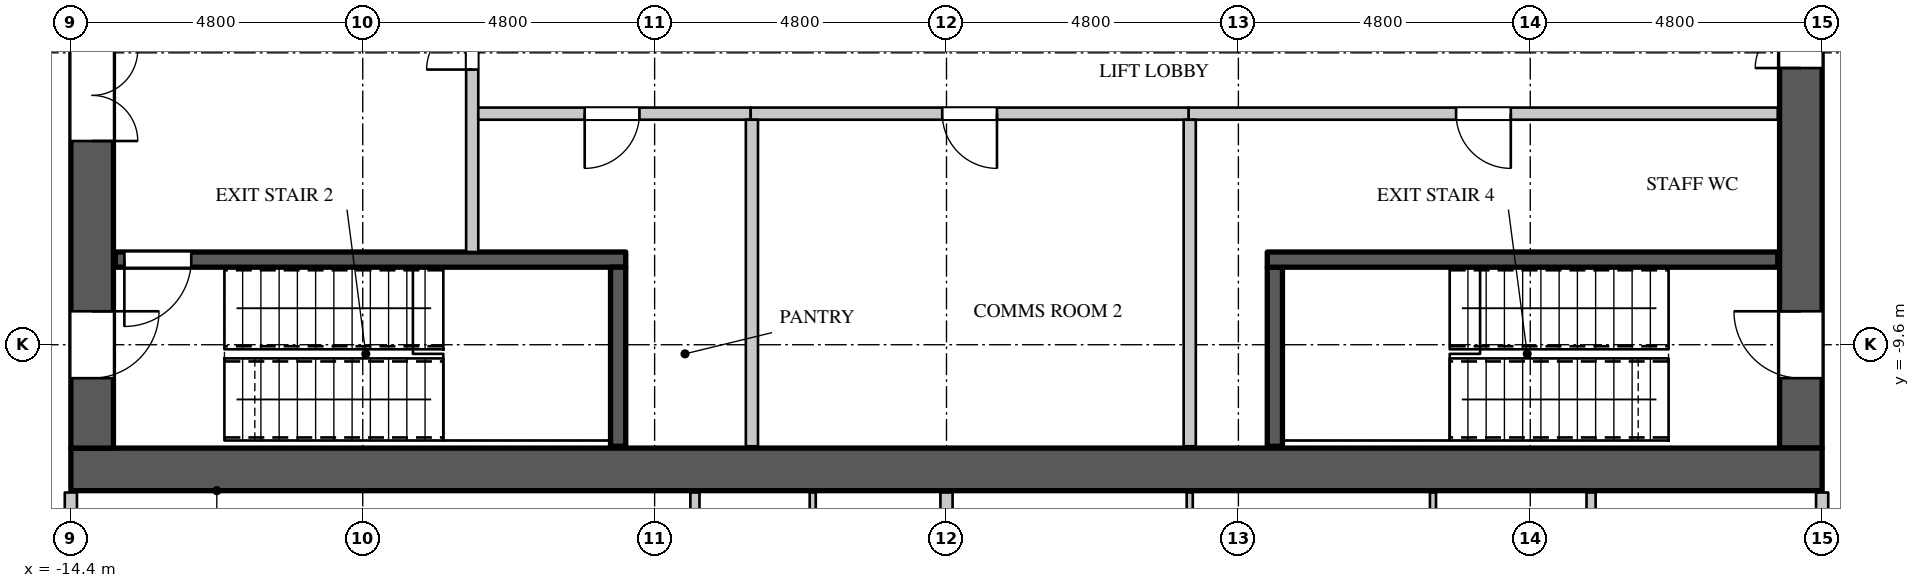
"""IFC4 building model, lengths in metres.
Left out: names, types, materials, properties, quantities, classifications, styles, units other than length and angle.
Written with IfcOpenShell. Run it as: python <this file> out.ifc"""

import sys

from ifc_helpers import new_model, si_unit, direction, frame, frame_2d, origin, place, context, subcontext, project, spatial, rectangle, extrude, element, fill, save


model = new_model("IFC4")
c1 = context("Model", 3, precision=1e-05, world=origin(), true_north=direction((0.0, 1.0)))
c2 = subcontext(c1, "Body", "Model", "MODEL_VIEW")
j1 = project(units=[si_unit("LENGTHUNIT", "METRE"), si_unit("PLANEANGLEUNIT", "RADIAN")], contexts=[c1])
p1 = place(None, origin())
s1 = spatial("IfcSite", under=j1, at=p1, CompositionType="ELEMENT")
p2 = place(p1, origin())
s2 = spatial("IfcBuilding", under=s1, at=p2, CompositionType="ELEMENT")
p3 = place(p2, frame((0.0, 0.0, 200.1)))
s3 = spatial("IfcBuildingStorey", under=s2, at=p3, CompositionType="ELEMENT", Elevation=200.1)
p4 = place(p3, frame((-14.4, -11.65, 0.0), z_axis=(0.0, 0.0, 1.0), x_axis=(1.0, 0.0, 0.0)))
e1 = element("IfcWall", 1, at=p4, inside=s3, PredefinedType="SHEAR", context=c2, shape_type="SweptSolid", body=[
    extrude(rectangle(XDim=28.8, YDim=0.7, at=frame_2d((14.4, 0.0))), origin(), (0.0, 0.0, 1.0), 4.2),
])
p5 = place(p3, frame((14.05, -11.3, 0.0), z_axis=(0.0, 0.0, 1.0), x_axis=(0.0, 1.0, 0.0)))
e2 = element("IfcWall", 2, at=p5, inside=s3, PredefinedType="SHEAR", context=c2, shape_type="SweptSolid", body=[
    extrude(rectangle(XDim=22.6, YDim=0.7, at=frame_2d((11.3, 0.0))), origin(), (0.0, 0.0, 1.0), 4.2),
])
p6 = place(p5, frame((20.35, 0.0, 0.0)))
e3 = element("IfcOpeningElement", 3, at=p6, cuts=e2, PredefinedType="OPENING", context=c2, shape_type="SweptSolid", body=[
    extrude(rectangle(XDim=1.1, YDim=2.2, at=frame_2d((0.55, 1.1))), frame((0.0, 0.36, 0.0), z_axis=(0.0, -1.0, 0.0), x_axis=(1.0, 0.0, 0.0)), (0.0, 0.0, 1.0), 0.72),
])
p7 = place(p5, frame((1.15, 0.0, 0.0)))
e4 = element("IfcOpeningElement", 4, at=p7, cuts=e2, PredefinedType="OPENING", context=c2, shape_type="SweptSolid", body=[
    extrude(rectangle(XDim=1.1, YDim=2.2, at=frame_2d((0.55, 1.1))), frame((0.0, 0.36, 0.0), z_axis=(0.0, -1.0, 0.0), x_axis=(1.0, 0.0, 0.0)), (0.0, 0.0, 1.0), 0.72),
])
p8 = place(p5, frame((14.85, 0.0, 0.0)))
e5 = element("IfcOpeningElement", 5, at=p8, cuts=e2, PredefinedType="OPENING", context=c2, shape_type="SweptSolid", body=[
    extrude(rectangle(XDim=1.5, YDim=2.4, at=frame_2d((0.75, 1.2))), frame((0.0, 0.36, 0.0), z_axis=(0.0, -1.0, 0.0), x_axis=(1.0, 0.0, 0.0)), (0.0, 0.0, 1.0), 0.72),
])
p9 = place(p5, frame((6.25, 0.0, 0.0)))
e6 = element("IfcOpeningElement", 6, at=p9, cuts=e2, PredefinedType="OPENING", context=c2, shape_type="SweptSolid", body=[
    extrude(rectangle(XDim=1.5, YDim=2.4, at=frame_2d((0.75, 1.2))), frame((0.0, 0.36, 0.0), z_axis=(0.0, -1.0, 0.0), x_axis=(1.0, 0.0, 0.0)), (0.0, 0.0, 1.0), 0.72),
])
p10 = place(p3, frame((-14.05, -11.3, 0.0), z_axis=(0.0, 0.0, 1.0), x_axis=(0.0, 1.0, 0.0)))
e7 = element("IfcWall", 7, at=p10, inside=s3, PredefinedType="SHEAR", context=c2, shape_type="SweptSolid", body=[
    extrude(rectangle(XDim=22.6, YDim=0.7, at=frame_2d((11.3, 0.0))), origin(), (0.0, 0.0, 1.0), 4.2),
])
p11 = place(p10, frame((20.35, 0.0, 0.0)))
e8 = element("IfcOpeningElement", 8, at=p11, cuts=e7, PredefinedType="OPENING", context=c2, shape_type="SweptSolid", body=[
    extrude(rectangle(XDim=1.1, YDim=2.2, at=frame_2d((0.55, 1.1))), frame((0.0, 0.36, 0.0), z_axis=(0.0, -1.0, 0.0), x_axis=(1.0, 0.0, 0.0)), (0.0, 0.0, 1.0), 0.72),
])
p12 = place(p10, frame((1.15, 0.0, 0.0)))
e9 = element("IfcOpeningElement", 9, at=p12, cuts=e7, PredefinedType="OPENING", context=c2, shape_type="SweptSolid", body=[
    extrude(rectangle(XDim=1.1, YDim=2.2, at=frame_2d((0.55, 1.1))), frame((0.0, 0.36, 0.0), z_axis=(0.0, -1.0, 0.0), x_axis=(1.0, 0.0, 0.0)), (0.0, 0.0, 1.0), 0.72),
])
p13 = place(p10, frame((16.05, 0.0, 0.0)))
e10 = element("IfcOpeningElement", 10, at=p13, cuts=e7, PredefinedType="OPENING", context=c2, shape_type="SweptSolid", body=[
    extrude(rectangle(XDim=1.5, YDim=2.4, at=frame_2d((0.75, 1.2))), frame((0.0, 0.36, 0.0), z_axis=(0.0, -1.0, 0.0), x_axis=(1.0, 0.0, 0.0)), (0.0, 0.0, 1.0), 0.72),
])
p14 = place(p10, frame((5.05, 0.0, 0.0)))
e11 = element("IfcOpeningElement", 11, at=p14, cuts=e7, PredefinedType="OPENING", context=c2, shape_type="SweptSolid", body=[
    extrude(rectangle(XDim=1.5, YDim=2.4, at=frame_2d((0.75, 1.2))), frame((0.0, 0.36, 0.0), z_axis=(0.0, -1.0, 0.0), x_axis=(1.0, 0.0, 0.0)), (0.0, 0.0, 1.0), 0.72),
])
p15 = place(p3, frame((-14.4, -14.3, 0.0), z_axis=(0.0, 0.0, 1.0), x_axis=(0.0, 1.0, 0.0)))
e12 = element("IfcWall", 12, at=p15, inside=s3, PredefinedType="PARTITIONING", context=c2, shape_type="SweptSolid", body=[
    extrude(rectangle(XDim=2.27, YDim=0.2, at=frame_2d((1.135, 0.0))), origin(), (0.0, 0.0, 1.0), 3.798),
])
p16 = place(p3, frame((-7.8, -8.075, 0.0), z_axis=(0.0, 0.0, 1.0), x_axis=(0.0, 1.0, 0.0)))
e13 = element("IfcWall", 13, at=p16, inside=s3, PredefinedType="PARTITIONING", context=c2, shape_type="SweptSolid", body=[
    extrude(rectangle(XDim=5.275, YDim=0.2, at=frame_2d((2.637, 0.0))), origin(), (0.0, 0.0, 1.0), 3.798),
])
p17 = place(p16, frame((3.0, 0.0, 0.0)))
e14 = element("IfcOpeningElement", 14, at=p17, cuts=e13, PredefinedType="OPENING", context=c2, shape_type="SweptSolid", body=[
    extrude(rectangle(XDim=1.5, YDim=2.4, at=frame_2d((0.75, 1.2))), frame((0.0, 0.11, 0.0), z_axis=(0.0, -1.0, 0.0), x_axis=(1.0, 0.0, 0.0)), (0.0, 0.0, 1.0), 0.22),
])
p18 = place(p3, frame((-7.7, -5.8, 0.0), z_axis=(0.0, 0.0, 1.0), x_axis=(1.0, 0.0, 0.0)))
e15 = element("IfcWall", 15, at=p18, inside=s3, PredefinedType="PARTITIONING", context=c2, shape_type="SweptSolid", body=[
    extrude(rectangle(XDim=4.48, YDim=0.2, at=frame_2d((2.24, 0.0))), origin(), (0.0, 0.0, 1.0), 3.798),
])
p19 = place(p18, frame((1.75, 0.0, 0.0)))
e16 = element("IfcOpeningElement", 16, at=p19, cuts=e15, PredefinedType="OPENING", context=c2, shape_type="SweptSolid", body=[
    extrude(rectangle(XDim=0.9, YDim=2.2, at=frame_2d((0.45, 1.1))), frame((0.0, 0.11, 0.0), z_axis=(0.0, -1.0, 0.0), x_axis=(1.0, 0.0, 0.0)), (0.0, 0.0, 1.0), 0.22),
])
p20 = place(p3, frame((3.98, -5.8, 0.0), z_axis=(0.0, 0.0, 1.0), x_axis=(1.0, 0.0, 0.0)))
e17 = element("IfcWall", 17, at=p20, inside=s3, PredefinedType="PARTITIONING", context=c2, shape_type="SweptSolid", body=[
    extrude(rectangle(XDim=9.69, YDim=0.2, at=frame_2d((4.845, 0.0))), origin(), (0.0, 0.0, 1.0), 3.798),
])
p21 = place(p20, frame((4.4, 0.0, 0.0)))
e18 = element("IfcOpeningElement", 18, at=p21, cuts=e17, PredefinedType="OPENING", context=c2, shape_type="SweptSolid", body=[
    extrude(rectangle(XDim=0.9, YDim=2.2, at=frame_2d((0.45, 1.1))), frame((0.0, 0.11, 0.0), z_axis=(0.0, -1.0, 0.0), x_axis=(1.0, 0.0, 0.0)), (0.0, 0.0, 1.0), 0.22),
])
p22 = place(p3, frame((14.4, -14.3, 0.0), z_axis=(0.0, 0.0, 1.0), x_axis=(0.0, 1.0, 0.0)))
e19 = element("IfcWall", 19, at=p22, inside=s3, PredefinedType="PARTITIONING", context=c2, shape_type="SweptSolid", body=[
    extrude(rectangle(XDim=2.27, YDim=0.2, at=frame_2d((1.135, 0.0))), origin(), (0.0, 0.0, 1.0), 3.798),
])
p23 = place(p22, frame((0.55, 0.0, 0.0)))
e20 = element("IfcOpeningElement", 20, at=p23, cuts=e19, PredefinedType="OPENING", context=c2, shape_type="SweptSolid", body=[
    extrude(rectangle(XDim=1.1, YDim=2.4, at=frame_2d((0.55, 1.2))), frame((0.0, 0.11, 0.0), z_axis=(0.0, -1.0, 0.0), x_axis=(1.0, 0.0, 0.0)), (0.0, 0.0, 1.0), 0.22),
])
p24 = place(p3, frame((-4.137, -23.4, 0.0), z_axis=(0.0, 0.0, 1.0), x_axis=(0.0, 1.0, 0.0)))
e21 = element("IfcWall", 21, at=p24, inside=s3, PredefinedType="PARTITIONING", context=c2, shape_type="SweptSolid", body=[
    extrude(rectangle(XDim=11.37, YDim=0.15, at=frame_2d((5.685, 0.0))), origin(), (0.0, 0.0, 1.0), 3.2),
])
p25 = place(p24, frame((3.05, 0.0, 0.0)))
e22 = element("IfcOpeningElement", 22, at=p25, cuts=e21, PredefinedType="OPENING", context=c2, shape_type="SweptSolid", body=[
    extrude(rectangle(XDim=0.95, YDim=2.2, at=frame_2d((0.475, 1.1))), frame((0.0, 0.085, 0.0), z_axis=(0.0, -1.0, 0.0), x_axis=(1.0, 0.0, 0.0)), (0.0, 0.0, 1.0), 0.17),
])
p26 = place(p3, frame((10.6, -17.425, 0.0), z_axis=(0.0, 0.0, 1.0), x_axis=(0.0, 1.0, 0.0)))
e23 = element("IfcWall", 23, at=p26, inside=s3, PredefinedType="PARTITIONING", context=c2, shape_type="SweptSolid", body=[
    extrude(rectangle(XDim=5.395, YDim=0.15, at=frame_2d((2.698, 0.0))), origin(), (0.0, 0.0, 1.0), 3.798),
])
p27 = place(p26, frame((2.2, 0.0, 0.0)))
e24 = element("IfcOpeningElement", 24, at=p27, cuts=e23, PredefinedType="OPENING", context=c2, shape_type="SweptSolid", body=[
    extrude(rectangle(XDim=0.95, YDim=2.2, at=frame_2d((0.475, 1.1))), frame((0.0, 0.085, 0.0), z_axis=(0.0, -1.0, 0.0), x_axis=(1.0, 0.0, 0.0)), (0.0, 0.0, 1.0), 0.17),
])
p28 = place(p3, frame((0.0, -24.055, 0.0), z_axis=(0.0, 0.0, 1.0), x_axis=(0.0, 1.0, 0.0)))
e25 = element("IfcWall", 25, at=p28, inside=s3, PredefinedType="PARTITIONING", context=c2, shape_type="SweptSolid", body=[
    extrude(rectangle(XDim=12.025, YDim=0.2, at=frame_2d((6.012, 0.0))), origin(), (0.0, 0.0, 1.0), 3.798),
])
p29 = place(p3, frame((-3.22, -5.8, 0.0), z_axis=(0.0, 0.0, 1.0), x_axis=(1.0, 0.0, 0.0)))
e26 = element("IfcWall", 26, at=p29, inside=s3, PredefinedType="PARTITIONING", context=c2, shape_type="SweptSolid", body=[
    extrude(rectangle(XDim=7.2, YDim=0.2, at=frame_2d((3.6, 0.0))), origin(), (0.0, 0.0, 1.0), 3.798),
])
p30 = place(p29, frame((3.15, 0.0, 0.0)))
e27 = element("IfcOpeningElement", 27, at=p30, cuts=e26, PredefinedType="OPENING", context=c2, shape_type="SweptSolid", body=[
    extrude(rectangle(XDim=0.9, YDim=2.2, at=frame_2d((0.45, 1.1))), frame((0.0, 0.11, 0.0), z_axis=(0.0, -1.0, 0.0), x_axis=(1.0, 0.0, 0.0)), (0.0, 0.0, 1.0), 0.22),
])
for number, where, z_axis, x_axis in (
    (28, (-3.2, -11.27, 0.0), (0.0, 0.0, 1.0), (0.0, 1.0, 0.0)),
    (29, (4.0, -11.27, 0.0), (0.0, 0.0, 1.0), (0.0, 1.0, 0.0)),
):
    element("IfcWall", number, at=place(p3, frame(where, z_axis=z_axis, x_axis=x_axis)), inside=s3, PredefinedType="PARTITIONING", context=c2, shape_type="SweptSolid", body=[
        extrude(rectangle(XDim=5.37, YDim=0.2, at=frame_2d((2.685, 0.0))), origin(), (0.0, 0.0, 1.0), 3.798),
    ])
p31 = place(p3, frame((-13.67, -8.2, 0.0), z_axis=(0.0, 0.0, 1.0), x_axis=(1.0, 0.0, 0.0)))
e30 = element("IfcWall", 30, at=p31, inside=s3, PredefinedType="SHEAR", context=c2, shape_type="SweptSolid", body=[
    extrude(rectangle(XDim=8.395, YDim=0.25, at=frame_2d((4.198, 0.0))), origin(), (0.0, 0.0, 1.0), 3.798),
])
p32 = place(p31, frame((0.15, 0.0, 0.0)))
e31 = element("IfcOpeningElement", 31, at=p32, cuts=e30, PredefinedType="OPENING", context=c2, shape_type="SweptSolid", body=[
    extrude(rectangle(XDim=1.1, YDim=2.2, at=frame_2d((0.55, 1.1))), frame((0.0, 0.135, 0.0), z_axis=(0.0, -1.0, 0.0), x_axis=(1.0, 0.0, 0.0)), (0.0, 0.0, 1.0), 0.27),
])
for number, where, z_axis, x_axis in (
    (32, (-5.4, -11.27, 0.0), (0.0, 0.0, 1.0), (0.0, 1.0, 0.0)),
    (33, (5.4, -11.27, 0.0), (0.0, 0.0, 1.0), (0.0, 1.0, 0.0)),
):
    element("IfcWall", number, at=place(p3, frame(where, z_axis=z_axis, x_axis=x_axis)), inside=s3, PredefinedType="SHEAR", context=c2, shape_type="SweptSolid", body=[
        extrude(rectangle(XDim=2.945, YDim=0.25, at=frame_2d((1.473, 0.0))), origin(), (0.0, 0.0, 1.0), 3.798),
    ])
p33 = place(p3, frame((5.275, -8.2, 0.0), z_axis=(0.0, 0.0, 1.0), x_axis=(1.0, 0.0, 0.0)))
e34 = element("IfcWall", 34, at=p33, inside=s3, PredefinedType="SHEAR", context=c2, shape_type="SweptSolid", body=[
    extrude(rectangle(XDim=8.395, YDim=0.25, at=frame_2d((4.198, 0.0))), origin(), (0.0, 0.0, 1.0), 3.798),
])
p34 = place(p3, frame((-2.2, -15.925, 0.0), z_axis=(0.0, 0.0, 1.0), x_axis=(0.0, 1.0, 0.0)))
e35 = element("IfcWall", 35, at=p34, inside=s3, PredefinedType="PARTITIONING", context=c2, shape_type="SweptSolid", body=[
    extrude(rectangle(XDim=3.895, YDim=0.1, at=frame_2d((1.948, 0.0))), origin(), (0.0, 0.0, 1.0), 3.798),
])
p35 = place(p3, frame((4.0, -16.95, 0.0), z_axis=(0.0, 0.0, 1.0), x_axis=(0.0, 1.0, 0.0)))
e36 = element("IfcWall", 36, at=p35, inside=s3, PredefinedType="PARTITIONING", context=c2, shape_type="SweptSolid", body=[
    extrude(rectangle(XDim=4.92, YDim=0.1, at=frame_2d((2.46, 0.0))), origin(), (0.0, 0.0, 1.0), 3.2),
])
p36 = place(p3, frame((8.0, -16.925, 0.0), z_axis=(0.0, 0.0, 1.0), x_axis=(0.0, 1.0, 0.0)))
e37 = element("IfcWall", 37, at=p36, inside=s3, PredefinedType="PARTITIONING", context=c2, shape_type="SweptSolid", body=[
    extrude(rectangle(XDim=4.895, YDim=0.1, at=frame_2d((2.448, 0.0))), origin(), (0.0, 0.0, 1.0), 3.798),
])
p37 = place(p19, origin())
e38 = element("IfcDoor", 38, at=p37, inside=s3, OperationType="SINGLE_SWING_RIGHT", PredefinedType="DOOR", context=c2, shape_type="SweptSolid", body=[
    extrude(rectangle(XDim=0.9, YDim=2.2, at=frame_2d((0.45, 1.1))), frame((0.0, 0.025, 0.0), z_axis=(0.0, -1.0, 0.0), x_axis=(1.0, 0.0, 0.0)), (0.0, 0.0, 1.0), 0.05),
])
fill(e16, e38)
p38 = place(p30, origin())
e39 = element("IfcDoor", 39, at=p38, inside=s3, OperationType="SINGLE_SWING_LEFT", PredefinedType="DOOR", context=c2, shape_type="SweptSolid", body=[
    extrude(rectangle(XDim=0.9, YDim=2.2, at=frame_2d((0.45, 1.1))), frame((0.0, 0.025, 0.0), z_axis=(0.0, -1.0, 0.0), x_axis=(1.0, 0.0, 0.0)), (0.0, 0.0, 1.0), 0.05),
])
fill(e27, e39)
p39 = place(p21, origin())
e40 = element("IfcDoor", 40, at=p39, inside=s3, OperationType="SINGLE_SWING_LEFT", PredefinedType="DOOR", context=c2, shape_type="SweptSolid", body=[
    extrude(rectangle(XDim=0.9, YDim=2.2, at=frame_2d((0.45, 1.1))), frame((0.0, 0.025, 0.0), z_axis=(0.0, -1.0, 0.0), x_axis=(1.0, 0.0, 0.0)), (0.0, 0.0, 1.0), 0.05),
])
fill(e18, e40)
p40 = place(p32, origin())
e41 = element("IfcDoor", 41, at=p40, inside=s3, OperationType="SINGLE_SWING_RIGHT", PredefinedType="DOOR", context=c2, shape_type="SweptSolid", body=[
    extrude(rectangle(XDim=1.1, YDim=2.2, at=frame_2d((0.55, 1.1))), frame((0.0, 0.025, 0.0), z_axis=(0.0, -1.0, 0.0), x_axis=(1.0, 0.0, 0.0)), (0.0, 0.0, 1.0), 0.05),
])
fill(e31, e41)
p41 = place(p17, origin())
e42 = element("IfcDoor", 42, at=p41, inside=s3, OperationType="DOUBLE_DOOR_SINGLE_SWING", PredefinedType="DOOR", context=c2, shape_type="SweptSolid", body=[
    extrude(rectangle(XDim=1.5, YDim=2.4, at=frame_2d((0.75, 1.2))), frame((0.0, 0.025, 0.0), z_axis=(0.0, -1.0, 0.0), x_axis=(1.0, 0.0, 0.0)), (0.0, 0.0, 1.0), 0.05),
])
fill(e14, e42)
p42 = place(p12, origin())
e43 = element("IfcDoor", 43, at=p42, inside=s3, OperationType="SINGLE_SWING_LEFT", PredefinedType="DOOR", context=c2, shape_type="SweptSolid", body=[
    extrude(rectangle(XDim=1.1, YDim=2.2, at=frame_2d((0.55, 1.1))), frame((0.0, -0.295, 0.0), z_axis=(0.0, -1.0, 0.0), x_axis=(1.0, 0.0, 0.0)), (0.0, 0.0, 1.0), 0.05),
])
fill(e9, e43)
p43 = place(p7, origin())
e44 = element("IfcDoor", 44, at=p43, inside=s3, OperationType="SINGLE_SWING_RIGHT", PredefinedType="DOOR", context=c2, shape_type="SweptSolid", body=[
    extrude(rectangle(XDim=1.1, YDim=2.2, at=frame_2d((0.55, 1.1))), frame((0.0, 0.345, 0.0), z_axis=(0.0, -1.0, 0.0), x_axis=(1.0, 0.0, 0.0)), (0.0, 0.0, 1.0), 0.05),
])
fill(e4, e44)
p44 = place(p14, origin())
e45 = element("IfcDoor", 45, at=p44, inside=s3, OperationType="DOUBLE_DOOR_SINGLE_SWING", PredefinedType="DOOR", context=c2, shape_type="SweptSolid", body=[
    extrude(rectangle(XDim=1.5, YDim=2.4, at=frame_2d((0.75, 1.2))), frame((0.0, -0.295, 0.0), z_axis=(0.0, -1.0, 0.0), x_axis=(1.0, 0.0, 0.0)), (0.0, 0.0, 1.0), 0.05),
])
fill(e11, e45)
p45 = place(p9, origin())
e46 = element("IfcDoor", 46, at=p45, inside=s3, OperationType="DOUBLE_DOOR_SINGLE_SWING", PredefinedType="DOOR", context=c2, shape_type="SweptSolid", body=[
    extrude(rectangle(XDim=1.5, YDim=2.4, at=frame_2d((0.75, 1.2))), frame((0.0, 0.345, 0.0), z_axis=(0.0, -1.0, 0.0), x_axis=(1.0, 0.0, 0.0)), (0.0, 0.0, 1.0), 0.05),
])
fill(e6, e46)
save(model, sys.argv[1])
